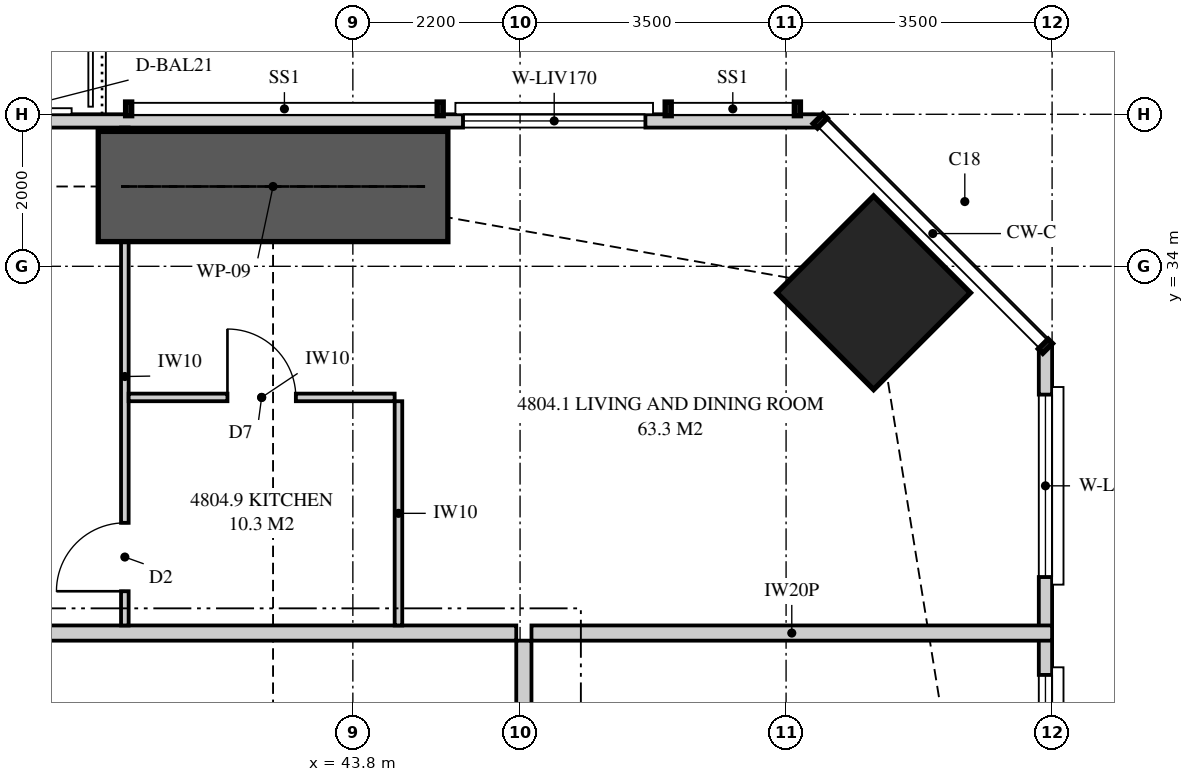
"""IFC4 building model, lengths in metres.
Left out: names, types, materials, properties, quantities, classifications, styles, units other than length and angle.
Written with IfcOpenShell. Run it as: python <this file> out.ifc"""

import sys

from ifc_helpers import new_model, si_unit, direction, frame, frame_2d, origin, origin_2d, place, context, subcontext, project, spatial, polyline, rectangle, outline, extrude, element, fill, save


model = new_model("IFC4")
c1 = context("Model", 3, precision=1e-05, world=origin(), true_north=direction((0.0, 1.0)))
c2 = subcontext(c1, "Body", "Model", "MODEL_VIEW")
j1 = project(units=[si_unit("LENGTHUNIT", "METRE"), si_unit("PLANEANGLEUNIT", "RADIAN")], contexts=[c1])
p1 = place(None, origin())
s1 = spatial("IfcSite", under=j1, at=p1, CompositionType="ELEMENT")
p2 = place(p1, origin())
s2 = spatial("IfcBuilding", under=s1, at=p2, CompositionType="ELEMENT")
p3 = place(p2, frame((0.0, 0.0, 177.8)))
s3 = spatial("IfcBuildingStorey", under=s2, at=p3, CompositionType="ELEMENT", Elevation=177.8)
p4 = place(p3, frame((50.652, 33.652, 0.0), z_axis=(0.0, 0.0, 1.0), x_axis=(0.707106781187, 0.707106781187, 0.0)))
e1 = element("IfcColumn", 1, at=p4, inside=s3, PredefinedType="COLUMN", context=c2, shape_type="SweptSolid", body=[
    extrude(rectangle(XDim=1.8, YDim=1.8, at=origin_2d()), origin(), (0.0, 0.0, 1.0), 3.35),
])
p5 = place(p3, frame((52.913, 3.051, 0.0), z_axis=(0.0, 0.0, 1.0), x_axis=(0.0, 1.0, 0.0)))
e2 = element("IfcWall", 2, at=p5, inside=s3, PredefinedType="SOLIDWALL", context=c2, shape_type="SweptSolid", body=[
    extrude(outline(polyline([(0.0, 0.0), (29.897, 0.0), (29.897, 3.11), (22.167, 3.11), (22.167, 2.15), (22.074, 2.15), (22.074, 3.11), (21.949, 3.11), (21.949, 2.15), (9.949, 2.15), (9.949, 3.11), (9.847, 3.11), (9.847, 2.15), (9.706, 2.15), (9.706, 3.11), (0.0, 3.11), (0.0, 0.0)])), frame((0.0, 0.087, 0.0), z_axis=(0.0, -1.0, 0.0), x_axis=(1.0, 0.0, 0.0)), (0.0, 0.0, 1.0), 0.175),
])
p6 = place(p5, frame((1.797, 0.0, 0.4)))
e3 = element("IfcOpeningElement", 3, at=p6, cuts=e2, PredefinedType="OPENING", context=c2, shape_type="SweptSolid", body=[
    extrude(rectangle(XDim=1.8, YDim=1.7, at=frame_2d((0.9, 0.85))), frame((0.0, 0.097, 0.0), z_axis=(0.0, -1.0, 0.0), x_axis=(1.0, 0.0, 0.0)), (0.0, 0.0, 1.0), 0.195),
])
p7 = place(p5, frame((6.321, 0.0, 0.4)))
e4 = element("IfcOpeningElement", 4, at=p7, cuts=e2, PredefinedType="OPENING", context=c2, shape_type="SweptSolid", body=[
    extrude(rectangle(XDim=1.2, YDim=1.7, at=frame_2d((0.6, 0.85))), frame((0.0, 0.097, 0.0), z_axis=(0.0, -1.0, 0.0), x_axis=(1.0, 0.0, 0.0)), (0.0, 0.0, 1.0), 0.195),
])
p8 = place(p5, frame((12.424, 0.0, 0.4)))
e5 = element("IfcOpeningElement", 5, at=p8, cuts=e2, PredefinedType="OPENING", context=c2, shape_type="SweptSolid", body=[
    extrude(rectangle(XDim=1.8, YDim=1.7, at=frame_2d((0.9, 0.85))), frame((0.0, 0.097, 0.0), z_axis=(0.0, -1.0, 0.0), x_axis=(1.0, 0.0, 0.0)), (0.0, 0.0, 1.0), 0.195),
])
p9 = place(p5, frame((15.274, 0.0, 0.0)))
e6 = element("IfcOpeningElement", 6, at=p9, cuts=e2, PredefinedType="OPENING", context=c2, shape_type="SweptSolid", body=[
    extrude(rectangle(XDim=1.8, YDim=2.1, at=frame_2d((0.9, 1.05))), frame((0.0, 0.097, 0.0), z_axis=(0.0, -1.0, 0.0), x_axis=(1.0, 0.0, 0.0)), (0.0, 0.0, 1.0), 0.195),
])
p10 = place(p5, frame((17.736, 0.0, 0.4)))
e7 = element("IfcOpeningElement", 7, at=p10, cuts=e2, PredefinedType="OPENING", context=c2, shape_type="SweptSolid", body=[
    extrude(rectangle(XDim=1.8, YDim=1.7, at=frame_2d((0.9, 0.85))), frame((0.0, 0.097, 0.0), z_axis=(0.0, -1.0, 0.0), x_axis=(1.0, 0.0, 0.0)), (0.0, 0.0, 1.0), 0.195),
])
p11 = place(p5, frame((24.373, 0.0, 0.4)))
e8 = element("IfcOpeningElement", 8, at=p11, cuts=e2, PredefinedType="OPENING", context=c2, shape_type="SweptSolid", body=[
    extrude(rectangle(XDim=1.2, YDim=1.7, at=frame_2d((0.6, 0.85))), frame((0.0, 0.097, 0.0), z_axis=(0.0, -1.0, 0.0), x_axis=(1.0, 0.0, 0.0)), (0.0, 0.0, 1.0), 0.195),
])
p12 = place(p5, frame((26.861, 0.0, 0.4)))
e9 = element("IfcOpeningElement", 9, at=p12, cuts=e2, PredefinedType="OPENING", context=c2, shape_type="SweptSolid", body=[
    extrude(rectangle(XDim=2.4, YDim=1.7, at=frame_2d((1.2, 0.85))), frame((0.0, 0.097, 0.0), z_axis=(0.0, -1.0, 0.0), x_axis=(1.0, 0.0, 0.0)), (0.0, 0.0, 1.0), 0.195),
])
p13 = place(p3, frame((49.949, 35.913, 0.0), z_axis=(0.0, 0.0, 1.0), x_axis=(-1.0, 0.0, 0.0)))
e10 = element("IfcWall", 10, at=p13, inside=s3, PredefinedType="SOLIDWALL", context=c2, shape_type="SweptSolid", body=[
    extrude(outline(polyline([(0.0, 0.0), (34.897, 0.0), (34.897, 3.11), (27.91, 3.11), (27.91, 2.15), (27.836, 2.15), (27.836, 3.11), (27.699, 3.11), (27.699, 2.15), (7.199, 2.15), (7.199, 3.11), (7.062, 3.11), (7.062, 2.15), (6.987, 2.15), (6.987, 3.11), (0.0, 3.11), (0.0, 0.0)])), frame((0.0, 0.087, 0.0), z_axis=(0.0, -1.0, 0.0), x_axis=(1.0, 0.0, 0.0)), (0.0, 0.0, 1.0), 0.175),
])
p14 = place(p13, frame((2.3, 0.0, 0.4)))
e11 = element("IfcOpeningElement", 11, at=p14, cuts=e10, PredefinedType="OPENING", context=c2, shape_type="SweptSolid", body=[
    extrude(rectangle(XDim=2.4, YDim=1.7, at=frame_2d((1.2, 0.85))), frame((0.0, 0.097, 0.0), z_axis=(0.0, -1.0, 0.0), x_axis=(1.0, 0.0, 0.0)), (0.0, 0.0, 1.0), 0.195),
])
p15 = place(p13, frame((10.299, 0.0, 0.0)))
e12 = element("IfcOpeningElement", 12, at=p15, cuts=e10, PredefinedType="OPENING", context=c2, shape_type="SweptSolid", body=[
    extrude(rectangle(XDim=1.8, YDim=2.1, at=frame_2d((0.9, 1.05))), frame((0.0, 0.097, 0.0), z_axis=(0.0, -1.0, 0.0), x_axis=(1.0, 0.0, 0.0)), (0.0, 0.0, 1.0), 0.195),
])
p16 = place(p13, frame((13.229, 0.0, 0.4)))
e13 = element("IfcOpeningElement", 13, at=p16, cuts=e10, PredefinedType="OPENING", context=c2, shape_type="SweptSolid", body=[
    extrude(rectangle(XDim=1.8, YDim=1.7, at=frame_2d((0.9, 0.85))), frame((0.0, 0.097, 0.0), z_axis=(0.0, -1.0, 0.0), x_axis=(1.0, 0.0, 0.0)), (0.0, 0.0, 1.0), 0.195),
])
p17 = place(p13, frame((19.879, 0.0, 0.4)))
e14 = element("IfcOpeningElement", 14, at=p17, cuts=e10, PredefinedType="OPENING", context=c2, shape_type="SweptSolid", body=[
    extrude(rectangle(XDim=1.8, YDim=1.7, at=frame_2d((0.9, 0.85))), frame((0.0, 0.097, 0.0), z_axis=(0.0, -1.0, 0.0), x_axis=(1.0, 0.0, 0.0)), (0.0, 0.0, 1.0), 0.195),
])
p18 = place(p13, frame((22.699, 0.0, 0.0)))
e15 = element("IfcOpeningElement", 15, at=p18, cuts=e10, PredefinedType="OPENING", context=c2, shape_type="SweptSolid", body=[
    extrude(rectangle(XDim=1.8, YDim=2.1, at=frame_2d((0.9, 1.05))), frame((0.0, 0.097, 0.0), z_axis=(0.0, -1.0, 0.0), x_axis=(1.0, 0.0, 0.0)), (0.0, 0.0, 1.0), 0.195),
])
p19 = place(p13, frame((30.243, 0.0, 0.4)))
e16 = element("IfcOpeningElement", 16, at=p19, cuts=e10, PredefinedType="OPENING", context=c2, shape_type="SweptSolid", body=[
    extrude(rectangle(XDim=1.2, YDim=1.7, at=frame_2d((0.6, 0.85))), frame((0.0, 0.097, 0.0), z_axis=(0.0, -1.0, 0.0), x_axis=(1.0, 0.0, 0.0)), (0.0, 0.0, 1.0), 0.195),
])
p20 = place(p3, frame((24.05, 29.175, 0.0), z_axis=(0.0, 0.0, 1.0), x_axis=(1.0, 0.0, 0.0)))
e17 = element("IfcWall", 17, at=p20, inside=s3, PredefinedType="PARTITIONING", context=c2, shape_type="SweptSolid", body=[
    extrude(outline(polyline([(0.0, 0.0), (21.9, 0.0), (21.9, 3.11), (19.037, 3.11), (19.037, 2.541), (18.363, 2.541), (18.363, 3.11), (8.787, 3.11), (8.787, 2.541), (8.113, 2.541), (8.113, 3.11), (0.0, 3.11), (0.0, 0.0)])), frame((0.0, 0.1, 0.0), z_axis=(0.0, -1.0, 0.0), x_axis=(1.0, 0.0, 0.0)), (0.0, 0.0, 1.0), 0.2),
])
p21 = place(p20, frame((13.925, 0.0, 0.0)))
e18 = element("IfcOpeningElement", 18, at=p21, cuts=e17, PredefinedType="OPENING", context=c2, shape_type="SweptSolid", body=[
    extrude(rectangle(XDim=1.05, YDim=2.2, at=frame_2d((0.525, 1.1))), frame((0.0, 0.11, 0.0), z_axis=(0.0, -1.0, 0.0), x_axis=(1.0, 0.0, 0.0)), (0.0, 0.0, 1.0), 0.22),
])
p22 = place(p3, frame((40.8, 35.825, 0.0), z_axis=(0.0, 0.0, 1.0), x_axis=(0.0, -1.0, 0.0)))
e19 = element("IfcWall", 19, at=p22, inside=s3, PredefinedType="PARTITIONING", context=c2, shape_type="SweptSolid", body=[
    extrude(outline(polyline([(0.0, 0.0), (6.55, 0.0), (6.55, 3.11), (1.635, 3.11), (1.635, 2.15), (0.0, 2.15), (0.0, 3.11), (0.0, 0.0)])), frame((0.0, 0.05, 0.0), z_axis=(0.0, -1.0, 0.0), x_axis=(1.0, 0.0, 0.0)), (0.0, 0.0, 1.0), 0.1),
])
p23 = place(p22, frame((5.2, 0.0, 0.0)))
e20 = element("IfcOpeningElement", 20, at=p23, cuts=e19, PredefinedType="OPENING", context=c2, shape_type="SweptSolid", body=[
    extrude(rectangle(XDim=0.9, YDim=2.1, at=frame_2d((0.45, 1.05))), frame((0.0, 0.06, 0.0), z_axis=(0.0, -1.0, 0.0), x_axis=(1.0, 0.0, 0.0)), (0.0, 0.0, 1.0), 0.12),
])
p24 = place(p3, frame((40.85, 32.275, 0.0), z_axis=(0.0, 0.0, 1.0), x_axis=(1.0, 0.0, 0.0)))
e21 = element("IfcWall", 21, at=p24, inside=s3, PredefinedType="PARTITIONING", context=c2, shape_type="SweptSolid", body=[
    extrude(outline(polyline([(0.0, 0.0), (3.5, 0.0), (3.5, 3.11), (2.188, 3.11), (2.188, 2.541), (1.613, 2.541), (1.613, 3.11), (0.0, 3.11), (0.0, 0.0)])), frame((0.0, 0.05, 0.0), z_axis=(0.0, -1.0, 0.0), x_axis=(1.0, 0.0, 0.0)), (0.0, 0.0, 1.0), 0.1),
])
p25 = place(p24, frame((1.3, 0.0, 0.0)))
e22 = element("IfcOpeningElement", 22, at=p25, cuts=e21, PredefinedType="OPENING", context=c2, shape_type="SweptSolid", body=[
    extrude(rectangle(XDim=0.9, YDim=2.1, at=frame_2d((0.45, 1.05))), frame((0.0, 0.06, 0.0), z_axis=(0.0, -1.0, 0.0), x_axis=(1.0, 0.0, 0.0)), (0.0, 0.0, 1.0), 0.12),
])
p26 = place(p3, frame((44.4, 32.225, 0.0), z_axis=(0.0, 0.0, 1.0), x_axis=(0.0, -1.0, 0.0)))
e23 = element("IfcWall", 23, at=p26, inside=s3, PredefinedType="PARTITIONING", context=c2, shape_type="SweptSolid", body=[
    extrude(rectangle(XDim=2.95, YDim=0.1, at=frame_2d((1.475, 0.0))), origin(), (0.0, 0.0, 1.0), 3.11),
])
p27 = place(p3, frame((46.15, 29.175, 0.0), z_axis=(0.0, 0.0, 1.0), x_axis=(1.0, 0.0, 0.0)))
e24 = element("IfcWall", 24, at=p27, inside=s3, PredefinedType="PARTITIONING", context=c2, shape_type="SweptSolid", body=[
    extrude(outline(polyline([(0.0, 0.0), (6.85, 0.0), (6.85, 3.11), (6.147, 3.11), (6.147, 2.15), (4.303, 2.15), (4.303, 3.11), (0.0, 3.11), (0.0, 0.0)])), frame((0.0, 0.1, 0.0), z_axis=(0.0, -1.0, 0.0), x_axis=(1.0, 0.0, 0.0)), (0.0, 0.0, 1.0), 0.2),
])
p28 = place(p3, frame((46.05, 23.25, 0.0), z_axis=(0.0, 0.0, 1.0), x_axis=(0.0, 1.0, 0.0)))
e25 = element("IfcWall", 25, at=p28, inside=s3, PredefinedType="PARTITIONING", context=c2, shape_type="SweptSolid", body=[
    extrude(outline(polyline([(0.0, 0.0), (5.825, 0.0), (5.825, 3.11), (2.087, 3.11), (2.087, 2.541), (1.413, 2.541), (1.413, 3.11), (0.0, 3.11), (0.0, 0.0)])), frame((0.0, 0.1, 0.0), z_axis=(0.0, -1.0, 0.0), x_axis=(1.0, 0.0, 0.0)), (0.0, 0.0, 1.0), 0.2),
])
p29 = place(p28, frame((2.413, 0.0, 0.0)))
e26 = element("IfcOpeningElement", 26, at=p29, cuts=e25, PredefinedType="OPENING", context=c2, shape_type="SweptSolid", body=[
    extrude(rectangle(XDim=1.05, YDim=2.2, at=frame_2d((0.525, 1.1))), frame((0.0, 0.11, 0.0), z_axis=(0.0, -1.0, 0.0), x_axis=(1.0, 0.0, 0.0)), (0.0, 0.0, 1.0), 0.22),
])
p30 = place(p3, frame((40.45, 35.05, 0.0), z_axis=(0.0, 0.0, 1.0), x_axis=(1.0, 0.0, 0.0)))
e27 = element("IfcWall", 27, at=p30, inside=s3, PredefinedType="SHEAR", context=c2, shape_type="SweptSolid", body=[
    extrude(rectangle(XDim=4.6, YDim=1.45, at=frame_2d((2.3, 0.0))), origin(), (0.0, 0.0, 1.0), 3.35),
])
p31 = place(p11, origin())
e28 = element("IfcWindow", 28, at=p31, inside=s3, PartitioningType="SINGLE_PANEL", PredefinedType="WINDOW", context=c2, shape_type="SweptSolid", body=[
    extrude(rectangle(XDim=1.2, YDim=1.7, at=frame_2d((0.6, 0.85))), frame((0.0, 0.03, 0.0), z_axis=(0.0, -1.0, 0.0), x_axis=(1.0, 0.0, 0.0)), (0.0, 0.0, 1.0), 0.06),
])
fill(e8, e28)
p32 = place(p12, origin())
e29 = element("IfcWindow", 29, at=p32, inside=s3, PartitioningType="SINGLE_PANEL", PredefinedType="WINDOW", context=c2, shape_type="SweptSolid", body=[
    extrude(rectangle(XDim=2.4, YDim=1.7, at=frame_2d((1.2, 0.85))), frame((0.0, 0.03, 0.0), z_axis=(0.0, -1.0, 0.0), x_axis=(1.0, 0.0, 0.0)), (0.0, 0.0, 1.0), 0.06),
])
fill(e9, e29)
p33 = place(p14, origin())
e30 = element("IfcWindow", 30, at=p33, inside=s3, PartitioningType="SINGLE_PANEL", PredefinedType="WINDOW", context=c2, shape_type="SweptSolid", body=[
    extrude(rectangle(XDim=2.4, YDim=1.7, at=frame_2d((1.2, 0.85))), frame((0.0, 0.03, 0.0), z_axis=(0.0, -1.0, 0.0), x_axis=(1.0, 0.0, 0.0)), (0.0, 0.0, 1.0), 0.06),
])
fill(e11, e30)
p34 = place(p23, frame((0.9, 0.0, 0.0), z_axis=(0.0, 0.0, 1.0), x_axis=(-1.0, 0.0, 0.0)))
e31 = element("IfcDoor", 31, at=p34, inside=s3, OperationType="SINGLE_SWING_LEFT", PredefinedType="DOOR", context=c2, shape_type="SweptSolid", body=[
    extrude(rectangle(XDim=0.9, YDim=2.1, at=frame_2d((0.45, 1.05))), frame((0.0, 0.025, 0.0), z_axis=(0.0, -1.0, 0.0), x_axis=(1.0, 0.0, 0.0)), (0.0, 0.0, 1.0), 0.05),
])
fill(e20, e31)
p35 = place(p25, origin())
e32 = element("IfcDoor", 32, at=p35, inside=s3, OperationType="SINGLE_SWING_LEFT", PredefinedType="DOOR", context=c2, shape_type="SweptSolid", body=[
    extrude(rectangle(XDim=0.9, YDim=2.1, at=frame_2d((0.45, 1.05))), frame((0.0, 0.025, 0.0), z_axis=(0.0, -1.0, 0.0), x_axis=(1.0, 0.0, 0.0)), (0.0, 0.0, 1.0), 0.05),
])
fill(e22, e32)
save(model, sys.argv[1])
